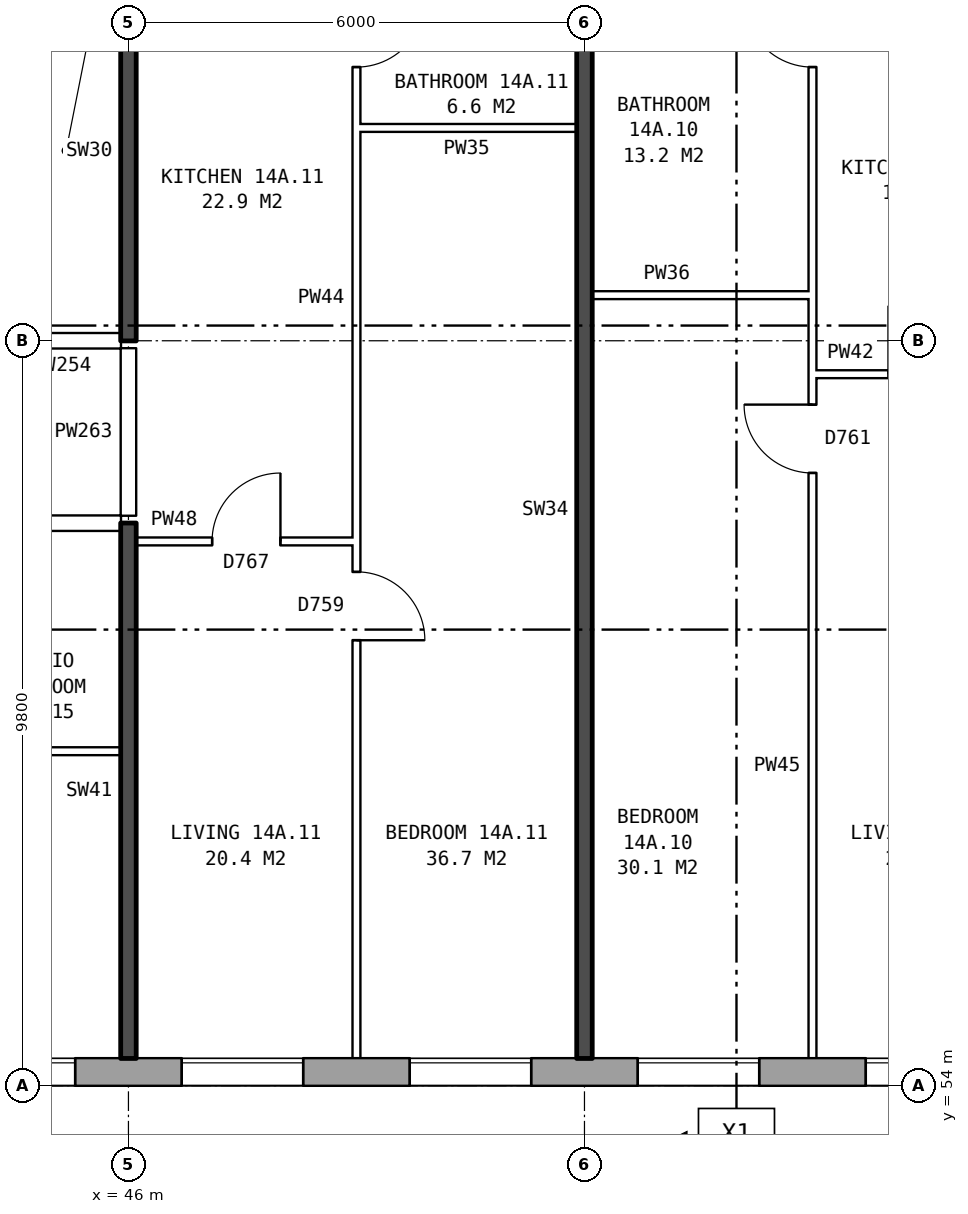
"""IFC4 building model, lengths in metres.
Left out: names, types, materials, properties, quantities, classifications, styles, units other than length and angle.
Written with IfcOpenShell. Run it as: python <this file> out.ifc"""

import sys

from ifc_helpers import new_model, si_unit, direction, frame, frame_2d, origin, place, context, subcontext, project, spatial, rectangle, extrude, element, fill, save


model = new_model("IFC4")
c1 = context("Model", 3, precision=1e-05, world=origin(), true_north=direction((0.0, 1.0)))
c2 = subcontext(c1, "Body", "Model", "MODEL_VIEW")
j1 = project(units=[si_unit("LENGTHUNIT", "METRE"), si_unit("PLANEANGLEUNIT", "RADIAN")], contexts=[c1])
p1 = place(None, origin())
s1 = spatial("IfcSite", under=j1, at=p1, CompositionType="ELEMENT")
p2 = place(p1, origin())
s2 = spatial("IfcBuilding", under=s1, at=p2, CompositionType="ELEMENT")
p3 = place(p2, frame((0.0, 0.0, 53.6)))
s3 = spatial("IfcBuildingStorey", under=s2, at=p3, CompositionType="ELEMENT", Elevation=53.6)
p4 = place(p3, frame((24.575, 54.18, 0.0), z_axis=(0.0, 0.0, 1.0), x_axis=(1.0, 0.0, 0.0)))
e1 = element("IfcWall", 1, at=p4, inside=s3, PredefinedType="STANDARD", context=c2, shape_type="SweptSolid", body=[
    extrude(rectangle(XDim=48.351, YDim=0.36, at=frame_2d((24.175, 0.0))), origin(), (0.0, 0.0, 1.0), 2.85),
])
p5 = place(p4, frame((1.125, 0.0, 0.8)))
e2 = element("IfcOpeningElement", 2, at=p5, cuts=e1, PredefinedType="OPENING", context=c2, shape_type="SweptSolid", body=[
    extrude(rectangle(XDim=1.6, YDim=1.8, at=frame_2d((0.8, 0.9))), frame((0.0, 0.19, 0.0), z_axis=(0.0, -1.0, 0.0), x_axis=(1.0, 0.0, 0.0)), (0.0, 0.0, 1.0), 0.38),
])
p6 = place(p4, frame((4.125, 0.0, 0.8)))
e3 = element("IfcOpeningElement", 3, at=p6, cuts=e1, PredefinedType="OPENING", context=c2, shape_type="SweptSolid", body=[
    extrude(rectangle(XDim=1.6, YDim=1.8, at=frame_2d((0.8, 0.9))), frame((0.0, 0.19, 0.0), z_axis=(0.0, -1.0, 0.0), x_axis=(1.0, 0.0, 0.0)), (0.0, 0.0, 1.0), 0.38),
])
p7 = place(p4, frame((7.125, 0.0, 0.8)))
e4 = element("IfcOpeningElement", 4, at=p7, cuts=e1, PredefinedType="OPENING", context=c2, shape_type="SweptSolid", body=[
    extrude(rectangle(XDim=1.6, YDim=1.8, at=frame_2d((0.8, 0.9))), frame((0.0, 0.19, 0.0), z_axis=(0.0, -1.0, 0.0), x_axis=(1.0, 0.0, 0.0)), (0.0, 0.0, 1.0), 0.38),
])
p8 = place(p4, frame((10.125, 0.0, 0.8)))
e5 = element("IfcOpeningElement", 5, at=p8, cuts=e1, PredefinedType="OPENING", context=c2, shape_type="SweptSolid", body=[
    extrude(rectangle(XDim=1.6, YDim=1.8, at=frame_2d((0.8, 0.9))), frame((0.0, 0.19, 0.0), z_axis=(0.0, -1.0, 0.0), x_axis=(1.0, 0.0, 0.0)), (0.0, 0.0, 1.0), 0.38),
])
p9 = place(p4, frame((12.025, 0.0, 1.7)))
e6 = element("IfcOpeningElement", 6, at=p9, cuts=e1, PredefinedType="OPENING", context=c2, shape_type="SweptSolid", body=[
    extrude(rectangle(XDim=0.8, YDim=0.9, at=frame_2d((0.4, 0.45))), frame((0.0, 0.19, 0.0), z_axis=(0.0, -1.0, 0.0), x_axis=(1.0, 0.0, 0.0)), (0.0, 0.0, 1.0), 0.38),
])
p10 = place(p4, frame((16.125, 0.0, 0.8)))
e7 = element("IfcOpeningElement", 7, at=p10, cuts=e1, PredefinedType="OPENING", context=c2, shape_type="SweptSolid", body=[
    extrude(rectangle(XDim=1.6, YDim=1.8, at=frame_2d((0.8, 0.9))), frame((0.0, 0.19, 0.0), z_axis=(0.0, -1.0, 0.0), x_axis=(1.0, 0.0, 0.0)), (0.0, 0.0, 1.0), 0.38),
])
p11 = place(p4, frame((19.125, 0.0, 0.8)))
e8 = element("IfcOpeningElement", 8, at=p11, cuts=e1, PredefinedType="OPENING", context=c2, shape_type="SweptSolid", body=[
    extrude(rectangle(XDim=1.6, YDim=1.8, at=frame_2d((0.8, 0.9))), frame((0.0, 0.19, 0.0), z_axis=(0.0, -1.0, 0.0), x_axis=(1.0, 0.0, 0.0)), (0.0, 0.0, 1.0), 0.38),
])
p12 = place(p4, frame((22.125, 0.0, 0.8)))
e9 = element("IfcOpeningElement", 9, at=p12, cuts=e1, PredefinedType="OPENING", context=c2, shape_type="SweptSolid", body=[
    extrude(rectangle(XDim=1.6, YDim=1.8, at=frame_2d((0.8, 0.9))), frame((0.0, 0.19, 0.0), z_axis=(0.0, -1.0, 0.0), x_axis=(1.0, 0.0, 0.0)), (0.0, 0.0, 1.0), 0.38),
])
p13 = place(p4, frame((25.125, 0.0, 0.8)))
e10 = element("IfcOpeningElement", 10, at=p13, cuts=e1, PredefinedType="OPENING", context=c2, shape_type="SweptSolid", body=[
    extrude(rectangle(XDim=1.6, YDim=1.8, at=frame_2d((0.8, 0.9))), frame((0.0, 0.19, 0.0), z_axis=(0.0, -1.0, 0.0), x_axis=(1.0, 0.0, 0.0)), (0.0, 0.0, 1.0), 0.38),
])
p14 = place(p4, frame((28.125, 0.0, 0.8)))
e11 = element("IfcOpeningElement", 11, at=p14, cuts=e1, PredefinedType="OPENING", context=c2, shape_type="SweptSolid", body=[
    extrude(rectangle(XDim=1.6, YDim=1.8, at=frame_2d((0.8, 0.9))), frame((0.0, 0.19, 0.0), z_axis=(0.0, -1.0, 0.0), x_axis=(1.0, 0.0, 0.0)), (0.0, 0.0, 1.0), 0.38),
])
p15 = place(p4, frame((31.125, 0.0, 0.8)))
e12 = element("IfcOpeningElement", 12, at=p15, cuts=e1, PredefinedType="OPENING", context=c2, shape_type="SweptSolid", body=[
    extrude(rectangle(XDim=1.6, YDim=1.8, at=frame_2d((0.8, 0.9))), frame((0.0, 0.19, 0.0), z_axis=(0.0, -1.0, 0.0), x_axis=(1.0, 0.0, 0.0)), (0.0, 0.0, 1.0), 0.38),
])
p16 = place(p4, frame((33.625, 0.0, 0.15)))
e13 = element("IfcOpeningElement", 13, at=p16, cuts=e1, PredefinedType="OPENING", context=c2, shape_type="SweptSolid", body=[
    extrude(rectangle(XDim=1.4, YDim=0.9, at=frame_2d((0.7, 0.45))), frame((0.0, 0.19, 0.0), z_axis=(0.0, -1.0, 0.0), x_axis=(1.0, 0.0, 0.0)), (0.0, 0.0, 1.0), 0.38),
])
p17 = place(p4, frame((37.125, 0.0, 0.8)))
e14 = element("IfcOpeningElement", 14, at=p17, cuts=e1, PredefinedType="OPENING", context=c2, shape_type="SweptSolid", body=[
    extrude(rectangle(XDim=1.6, YDim=1.8, at=frame_2d((0.8, 0.9))), frame((0.0, 0.19, 0.0), z_axis=(0.0, -1.0, 0.0), x_axis=(1.0, 0.0, 0.0)), (0.0, 0.0, 1.0), 0.38),
])
p18 = place(p4, frame((40.125, 0.0, 0.8)))
e15 = element("IfcOpeningElement", 15, at=p18, cuts=e1, PredefinedType="OPENING", context=c2, shape_type="SweptSolid", body=[
    extrude(rectangle(XDim=1.6, YDim=1.8, at=frame_2d((0.8, 0.9))), frame((0.0, 0.19, 0.0), z_axis=(0.0, -1.0, 0.0), x_axis=(1.0, 0.0, 0.0)), (0.0, 0.0, 1.0), 0.38),
])
p19 = place(p4, frame((43.125, 0.0, 0.8)))
e16 = element("IfcOpeningElement", 16, at=p19, cuts=e1, PredefinedType="OPENING", context=c2, shape_type="SweptSolid", body=[
    extrude(rectangle(XDim=1.6, YDim=1.8, at=frame_2d((0.8, 0.9))), frame((0.0, 0.19, 0.0), z_axis=(0.0, -1.0, 0.0), x_axis=(1.0, 0.0, 0.0)), (0.0, 0.0, 1.0), 0.38),
])
p20 = place(p4, frame((46.125, 0.0, 0.8)))
e17 = element("IfcOpeningElement", 17, at=p20, cuts=e1, PredefinedType="OPENING", context=c2, shape_type="SweptSolid", body=[
    extrude(rectangle(XDim=1.6, YDim=1.8, at=frame_2d((0.8, 0.9))), frame((0.0, 0.19, 0.0), z_axis=(0.0, -1.0, 0.0), x_axis=(1.0, 0.0, 0.0)), (0.0, 0.0, 1.0), 0.38),
])
p21 = place(p4, frame((14.325, 0.0, 0.8)))
e18 = element("IfcOpeningElement", 18, at=p21, cuts=e1, PredefinedType="OPENING", context=c2, shape_type="SweptSolid", body=[
    extrude(rectangle(XDim=0.8, YDim=0.9, at=frame_2d((0.4, 0.45))), frame((0.0, 0.19, 0.0), z_axis=(0.0, -1.0, 0.0), x_axis=(1.0, 0.0, 0.0)), (0.0, 0.0, 1.0), 0.38),
])
p22 = place(p4, frame((35.525, 0.0, 1.65)))
e19 = element("IfcOpeningElement", 19, at=p22, cuts=e1, PredefinedType="OPENING", context=c2, shape_type="SweptSolid", body=[
    extrude(rectangle(XDim=0.6, YDim=0.9, at=frame_2d((0.3, 0.45))), frame((0.0, 0.19, 0.0), z_axis=(0.0, -1.0, 0.0), x_axis=(1.0, 0.0, 0.0)), (0.0, 0.0, 1.0), 0.38),
])
p23 = place(p3, frame((43.6, 58.4, 0.0), z_axis=(0.0, 0.0, 1.0), x_axis=(1.0, 0.0, 0.0)))
e20 = element("IfcWall", 20, at=p23, inside=s3, PredefinedType="PARTITIONING", context=c2, shape_type="SweptSolid", body=[
    extrude(rectangle(XDim=2.3, YDim=0.1, at=frame_2d((1.15, 0.0))), origin(), (0.0, 0.0, 1.0), 2.85),
])
p24 = place(p3, frame((46.1, 61.16, 0.0), z_axis=(0.0, 0.0, 1.0), x_axis=(1.0, 0.0, 0.0)))
e21 = element("IfcWall", 21, at=p24, inside=s3, PredefinedType="PARTITIONING", context=c2, shape_type="SweptSolid", body=[
    extrude(rectangle(XDim=2.9, YDim=0.1, at=frame_2d((1.45, 0.0))), origin(), (0.0, 0.0, 1.0), 2.85),
])
p25 = place(p24, frame((1.0, 0.0, 0.0)))
e22 = element("IfcOpeningElement", 22, at=p25, cuts=e21, PredefinedType="OPENING", context=c2, shape_type="SweptSolid", body=[
    extrude(rectangle(XDim=0.9, YDim=2.1, at=frame_2d((0.45, 1.05))), frame((0.0, 0.06, 0.0), z_axis=(0.0, -1.0, 0.0), x_axis=(1.0, 0.0, 0.0)), (0.0, 0.0, 1.0), 0.12),
])
p26 = place(p3, frame((21.86, 61.4, 0.0), z_axis=(0.0, 0.0, 1.0), x_axis=(1.0, 0.0, 0.0)))
e23 = element("IfcWall", 23, at=p26, inside=s3, PredefinedType="PARTITIONING", context=c2, shape_type="SweptSolid", body=[
    extrude(rectangle(XDim=24.04, YDim=0.2, at=frame_2d((12.02, 0.0))), origin(), (0.0, 0.0, 1.0), 2.85),
])
p27 = place(p26, frame((19.44, 0.0, 0.0)))
e24 = element("IfcOpeningElement", 24, at=p27, cuts=e23, PredefinedType="OPENING", context=c2, shape_type="SweptSolid", body=[
    extrude(rectangle(XDim=1.0, YDim=2.1, at=frame_2d((0.5, 1.05))), frame((0.0, 0.11, 0.0), z_axis=(0.0, -1.0, 0.0), x_axis=(1.0, 0.0, 0.0)), (0.0, 0.0, 1.0), 0.22),
])
p28 = place(p26, frame((14.64, 0.0, 0.0)))
e25 = element("IfcOpeningElement", 25, at=p28, cuts=e23, PredefinedType="OPENING", context=c2, shape_type="SweptSolid", body=[
    extrude(rectangle(XDim=1.0, YDim=2.1, at=frame_2d((0.5, 1.05))), frame((0.0, 0.11, 0.0), z_axis=(0.0, -1.0, 0.0), x_axis=(1.0, 0.0, 0.0)), (0.0, 0.0, 1.0), 0.22),
])
p29 = place(p26, frame((2.57, 0.0, 0.0)))
e26 = element("IfcOpeningElement", 26, at=p29, cuts=e23, PredefinedType="OPENING", context=c2, shape_type="SweptSolid", body=[
    extrude(rectangle(XDim=1.0, YDim=2.1, at=frame_2d((0.5, 1.05))), frame((0.0, 0.11, 0.0), z_axis=(0.0, -1.0, 0.0), x_axis=(1.0, 0.0, 0.0)), (0.0, 0.0, 1.0), 0.22),
])
p30 = place(p3, frame((55.0, 63.36, 0.0), z_axis=(0.0, 0.0, 1.0), x_axis=(1.0, 0.0, 0.0)))
e27 = element("IfcWall", 27, at=p30, inside=s3, PredefinedType="PARTITIONING", context=c2, shape_type="SweptSolid", body=[
    extrude(rectangle(XDim=2.9, YDim=0.1, at=frame_2d((1.45, 0.0))), origin(), (0.0, 0.0, 1.0), 2.85),
])
p31 = place(p30, frame((1.0, 0.0, 0.0)))
e28 = element("IfcOpeningElement", 28, at=p31, cuts=e27, PredefinedType="OPENING", context=c2, shape_type="SweptSolid", body=[
    extrude(rectangle(XDim=0.9, YDim=2.1, at=frame_2d((0.45, 1.05))), frame((0.0, 0.06, 0.0), z_axis=(0.0, -1.0, 0.0), x_axis=(1.0, 0.0, 0.0)), (0.0, 0.0, 1.0), 0.12),
])
p32 = place(p3, frame((44.36, 63.8, 0.0), z_axis=(0.0, 0.0, 1.0), x_axis=(1.0, 0.0, 0.0)))
e29 = element("IfcWall", 29, at=p32, inside=s3, PredefinedType="PARTITIONING", context=c2, shape_type="SweptSolid", body=[
    extrude(rectangle(XDim=1.54, YDim=0.2, at=frame_2d((0.77, 0.0))), origin(), (0.0, 0.0, 1.0), 2.85),
])
for number, where, z_axis, x_axis in (
    (30, (52.1, 64.4, 0.0), (0.0, 0.0, 1.0), (1.0, 0.0, 0.0)),
    (31, (49.0, 66.6, 0.0), (0.0, 0.0, 1.0), (1.0, 0.0, 0.0)),
):
    element("IfcWall", number, at=place(p3, frame(where, z_axis=z_axis, x_axis=x_axis)), inside=s3, PredefinedType="PARTITIONING", context=c2, shape_type="SweptSolid", body=[
        extrude(rectangle(XDim=2.9, YDim=0.1, at=frame_2d((1.45, 0.0))), origin(), (0.0, 0.0, 1.0), 2.85),
    ])
p33 = place(p3, frame((46.0, 54.36, 0.0), z_axis=(0.0, 0.0, 1.0), x_axis=(0.0, 1.0, 0.0)))
e32 = element("IfcWall", 32, at=p33, inside=s3, PredefinedType="SOLIDWALL", context=c2, shape_type="SweptSolid", body=[
    extrude(rectangle(XDim=7.04, YDim=0.2, at=frame_2d((3.52, 0.0))), origin(), (0.0, 0.0, 1.0), 2.85),
])
p34 = place(p3, frame((46.0, 61.5, 0.0), z_axis=(0.0, 0.0, 1.0), x_axis=(0.0, 1.0, 0.0)))
e33 = element("IfcWall", 33, at=p34, inside=s3, PredefinedType="PARTITIONING", context=c2, shape_type="SweptSolid", body=[
    extrude(rectangle(XDim=2.2, YDim=0.2, at=frame_2d((1.1, 0.0))), origin(), (0.0, 0.0, 1.0), 2.85),
])
p35 = place(p3, frame((46.0, 63.8, 0.0), z_axis=(0.0, 0.0, 1.0), x_axis=(0.0, 1.0, 0.0)))
e34 = element("IfcWall", 34, at=p35, inside=s3, PredefinedType="SOLIDWALL", context=c2, shape_type="SweptSolid", body=[
    extrude(rectangle(XDim=5.0, YDim=0.2, at=frame_2d((2.5, 0.0))), origin(), (0.0, 0.0, 1.0), 2.85),
])
p36 = place(p3, frame((49.0, 54.36, 0.0), z_axis=(0.0, 0.0, 1.0), x_axis=(0.0, 1.0, 0.0)))
e35 = element("IfcWall", 35, at=p36, inside=s3, PredefinedType="PARTITIONING", context=c2, shape_type="SweptSolid", body=[
    extrude(rectangle(XDim=14.34, YDim=0.1, at=frame_2d((7.17, 0.0))), origin(), (0.0, 0.0, 1.0), 2.85),
])
p37 = place(p36, frame((5.5, 0.0, 0.0)))
e36 = element("IfcOpeningElement", 36, at=p37, cuts=e35, PredefinedType="OPENING", context=c2, shape_type="SweptSolid", body=[
    extrude(rectangle(XDim=0.9, YDim=2.1, at=frame_2d((0.45, 1.05))), frame((0.0, 0.06, 0.0), z_axis=(0.0, -1.0, 0.0), x_axis=(1.0, 0.0, 0.0)), (0.0, 0.0, 1.0), 0.12),
])
p38 = place(p36, frame((13.04, 0.0, 0.0)))
e37 = element("IfcOpeningElement", 37, at=p38, cuts=e35, PredefinedType="OPENING", context=c2, shape_type="SweptSolid", body=[
    extrude(rectangle(XDim=0.9, YDim=2.1, at=frame_2d((0.45, 1.05))), frame((0.0, 0.06, 0.0), z_axis=(0.0, -1.0, 0.0), x_axis=(1.0, 0.0, 0.0)), (0.0, 0.0, 1.0), 0.12),
])
p39 = place(p3, frame((52.0, 54.36, 0.0), z_axis=(0.0, 0.0, 1.0), x_axis=(0.0, 1.0, 0.0)))
e38 = element("IfcWall", 38, at=p39, inside=s3, PredefinedType="SOLIDWALL", context=c2, shape_type="SweptSolid", body=[
    extrude(rectangle(XDim=14.44, YDim=0.2, at=frame_2d((7.22, 0.0))), origin(), (0.0, 0.0, 1.0), 2.85),
])
p40 = place(p3, frame((55.0, 54.36, 0.0), z_axis=(0.0, 0.0, 1.0), x_axis=(0.0, 1.0, 0.0)))
e39 = element("IfcWall", 39, at=p40, inside=s3, PredefinedType="PARTITIONING", context=c2, shape_type="SweptSolid", body=[
    extrude(rectangle(XDim=14.34, YDim=0.1, at=frame_2d((7.17, 0.0))), origin(), (0.0, 0.0, 1.0), 2.85),
])
p41 = place(p40, frame((7.7, 0.0, 0.0)))
e40 = element("IfcOpeningElement", 40, at=p41, cuts=e39, PredefinedType="OPENING", context=c2, shape_type="SweptSolid", body=[
    extrude(rectangle(XDim=0.9, YDim=2.1, at=frame_2d((0.45, 1.05))), frame((0.0, 0.06, 0.0), z_axis=(0.0, -1.0, 0.0), x_axis=(1.0, 0.0, 0.0)), (0.0, 0.0, 1.0), 0.12),
])
p42 = place(p40, frame((13.04, 0.0, 0.0)))
e41 = element("IfcOpeningElement", 41, at=p42, cuts=e39, PredefinedType="OPENING", context=c2, shape_type="SweptSolid", body=[
    extrude(rectangle(XDim=0.9, YDim=2.1, at=frame_2d((0.45, 1.05))), frame((0.0, 0.06, 0.0), z_axis=(0.0, -1.0, 0.0), x_axis=(1.0, 0.0, 0.0)), (0.0, 0.0, 1.0), 0.12),
])
p43 = place(p11, origin())
e42 = element("IfcWindow", 42, at=p43, inside=s3, PartitioningType="SINGLE_PANEL", PredefinedType="WINDOW", context=c2, shape_type="SweptSolid", body=[
    extrude(rectangle(XDim=1.6, YDim=1.8, at=frame_2d((0.8, 0.9))), frame((0.0, 0.15, 0.0), z_axis=(0.0, -1.0, 0.0), x_axis=(1.0, 0.0, 0.0)), (0.0, 0.0, 1.0), 0.06),
])
fill(e8, e42)
p44 = place(p12, origin())
e43 = element("IfcWindow", 43, at=p44, inside=s3, PartitioningType="SINGLE_PANEL", PredefinedType="WINDOW", context=c2, shape_type="SweptSolid", body=[
    extrude(rectangle(XDim=1.6, YDim=1.8, at=frame_2d((0.8, 0.9))), frame((0.0, 0.15, 0.0), z_axis=(0.0, -1.0, 0.0), x_axis=(1.0, 0.0, 0.0)), (0.0, 0.0, 1.0), 0.06),
])
fill(e9, e43)
p45 = place(p13, origin())
e44 = element("IfcWindow", 44, at=p45, inside=s3, PartitioningType="SINGLE_PANEL", PredefinedType="WINDOW", context=c2, shape_type="SweptSolid", body=[
    extrude(rectangle(XDim=1.6, YDim=1.8, at=frame_2d((0.8, 0.9))), frame((0.0, 0.15, 0.0), z_axis=(0.0, -1.0, 0.0), x_axis=(1.0, 0.0, 0.0)), (0.0, 0.0, 1.0), 0.06),
])
fill(e10, e44)
p46 = place(p14, origin())
e45 = element("IfcWindow", 45, at=p46, inside=s3, PartitioningType="SINGLE_PANEL", PredefinedType="WINDOW", context=c2, shape_type="SweptSolid", body=[
    extrude(rectangle(XDim=1.6, YDim=1.8, at=frame_2d((0.8, 0.9))), frame((0.0, 0.15, 0.0), z_axis=(0.0, -1.0, 0.0), x_axis=(1.0, 0.0, 0.0)), (0.0, 0.0, 1.0), 0.06),
])
fill(e11, e45)
p47 = place(p15, origin())
e46 = element("IfcWindow", 46, at=p47, inside=s3, PartitioningType="SINGLE_PANEL", PredefinedType="WINDOW", context=c2, shape_type="SweptSolid", body=[
    extrude(rectangle(XDim=1.6, YDim=1.8, at=frame_2d((0.8, 0.9))), frame((0.0, 0.15, 0.0), z_axis=(0.0, -1.0, 0.0), x_axis=(1.0, 0.0, 0.0)), (0.0, 0.0, 1.0), 0.06),
])
fill(e12, e46)
p48 = place(p41, origin())
e47 = element("IfcDoor", 47, at=p48, inside=s3, OperationType="SINGLE_SWING_RIGHT", PredefinedType="DOOR", context=c2, shape_type="SweptSolid", body=[
    extrude(rectangle(XDim=0.9, YDim=2.1, at=frame_2d((0.45, 1.05))), frame((0.0, 0.025, 0.0), z_axis=(0.0, -1.0, 0.0), x_axis=(1.0, 0.0, 0.0)), (0.0, 0.0, 1.0), 0.05),
])
fill(e40, e47)
p49 = place(p42, origin())
e48 = element("IfcDoor", 48, at=p49, inside=s3, OperationType="SINGLE_SWING_RIGHT", PredefinedType="DOOR", context=c2, shape_type="SweptSolid", body=[
    extrude(rectangle(XDim=0.9, YDim=2.1, at=frame_2d((0.45, 1.05))), frame((0.0, 0.025, 0.0), z_axis=(0.0, -1.0, 0.0), x_axis=(1.0, 0.0, 0.0)), (0.0, 0.0, 1.0), 0.05),
])
fill(e41, e48)
p50 = place(p37, frame((0.9, 0.0, 0.0), z_axis=(0.0, 0.0, 1.0), x_axis=(-1.0, 0.0, 0.0)))
e49 = element("IfcDoor", 49, at=p50, inside=s3, OperationType="SINGLE_SWING_RIGHT", PredefinedType="DOOR", context=c2, shape_type="SweptSolid", body=[
    extrude(rectangle(XDim=0.9, YDim=2.1, at=frame_2d((0.45, 1.05))), frame((0.0, 0.025, 0.0), z_axis=(0.0, -1.0, 0.0), x_axis=(1.0, 0.0, 0.0)), (0.0, 0.0, 1.0), 0.05),
])
fill(e36, e49)
p51 = place(p25, origin())
e50 = element("IfcDoor", 50, at=p51, inside=s3, OperationType="SINGLE_SWING_RIGHT", PredefinedType="DOOR", context=c2, shape_type="SweptSolid", body=[
    extrude(rectangle(XDim=0.9, YDim=2.1, at=frame_2d((0.45, 1.05))), frame((0.0, 0.025, 0.0), z_axis=(0.0, -1.0, 0.0), x_axis=(1.0, 0.0, 0.0)), (0.0, 0.0, 1.0), 0.05),
])
fill(e22, e50)
p52 = place(p38, frame((0.9, 0.0, 0.0), z_axis=(0.0, 0.0, 1.0), x_axis=(-1.0, 0.0, 0.0)))
e51 = element("IfcDoor", 51, at=p52, inside=s3, OperationType="SINGLE_SWING_LEFT", PredefinedType="DOOR", context=c2, shape_type="SweptSolid", body=[
    extrude(rectangle(XDim=0.9, YDim=2.1, at=frame_2d((0.45, 1.05))), frame((0.0, 0.025, 0.0), z_axis=(0.0, -1.0, 0.0), x_axis=(1.0, 0.0, 0.0)), (0.0, 0.0, 1.0), 0.05),
])
fill(e37, e51)
save(model, sys.argv[1])
